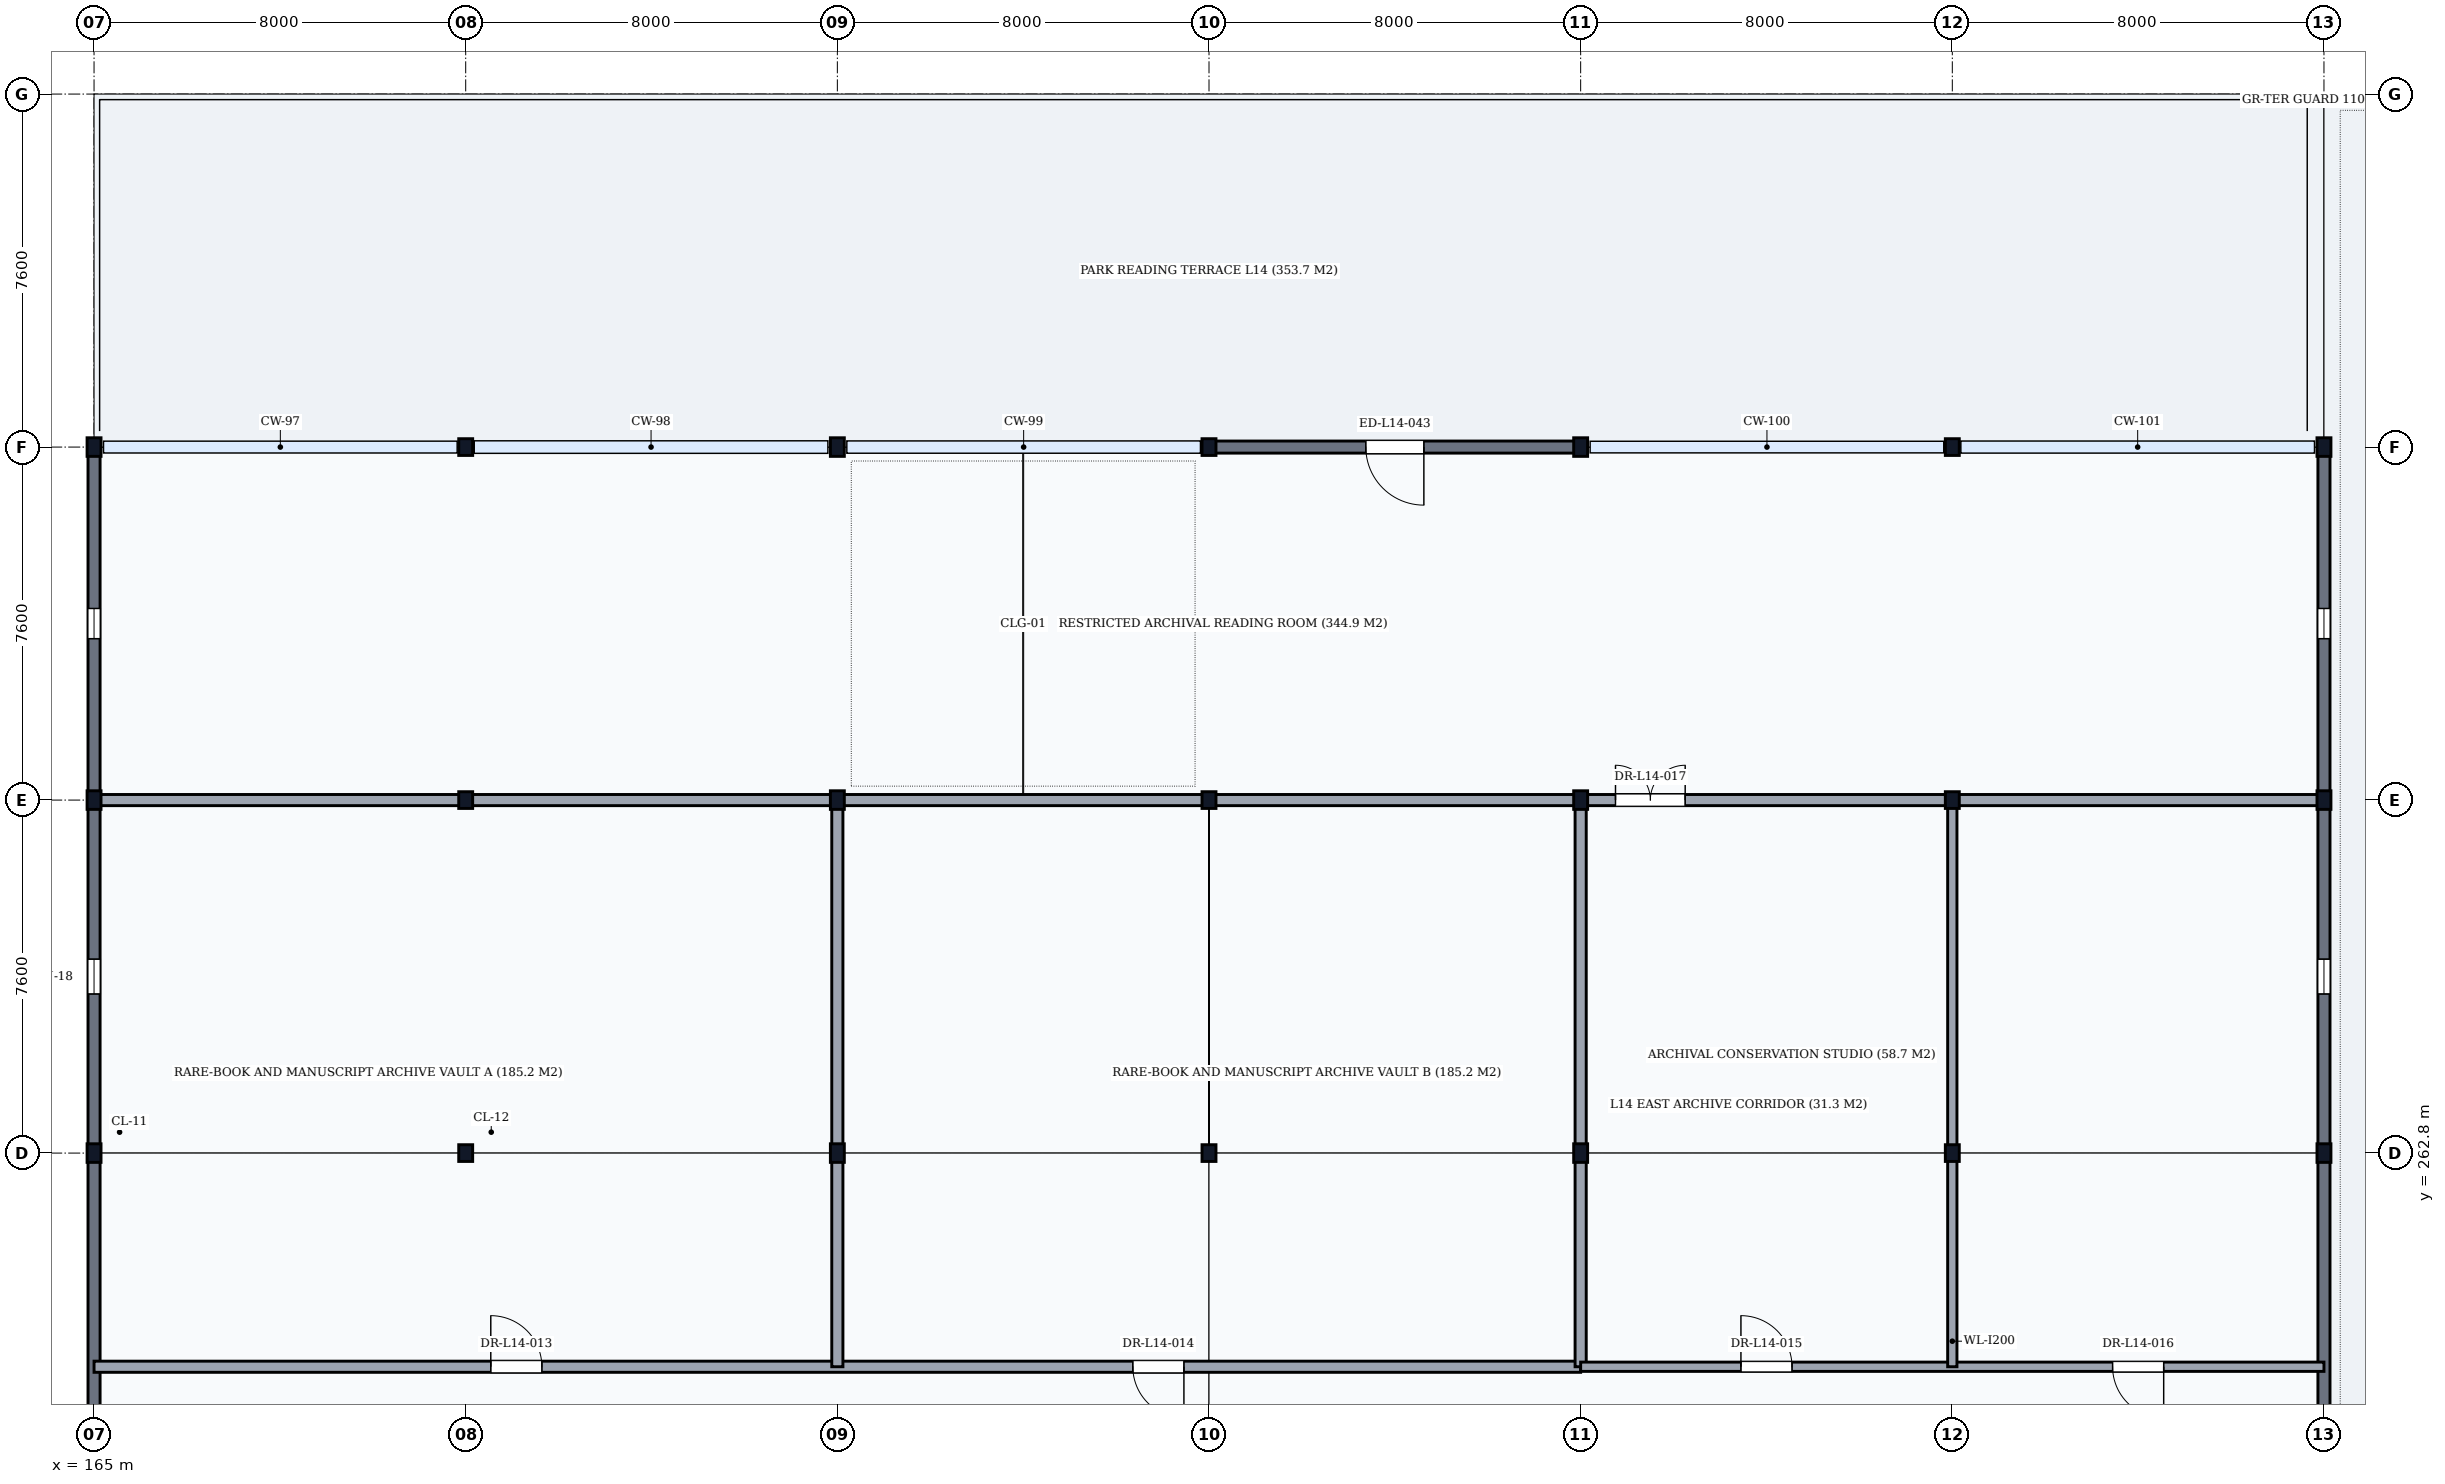
"""IFC4 building model, lengths in metres.
Left out: names, types, materials, properties, quantities, classifications, styles, units other than length and angle.
Written with IfcOpenShell. Run it as: python <this file> out.ifc"""

import sys

from ifc_helpers import new_model, si_unit, direction, frame, frame_2d, origin, origin_2d, place, context, subcontext, project, spatial, rectangle, i_section, extrude, element, fill, save


model = new_model("IFC4")
c1 = context("Model", 3, precision=1e-05, world=origin(), true_north=direction((0.0, 1.0)))
c2 = subcontext(c1, "Body", "Model", "MODEL_VIEW")
j1 = project(units=[si_unit("LENGTHUNIT", "METRE"), si_unit("PLANEANGLEUNIT", "RADIAN")], contexts=[c1])
p1 = place(None, origin())
s1 = spatial("IfcSite", under=j1, at=p1, CompositionType="ELEMENT")
p2 = place(p1, origin())
s2 = spatial("IfcBuilding", under=s1, at=p2, CompositionType="ELEMENT")
p3 = place(p2, frame((0.0, 0.0, 56.1)))
s3 = spatial("IfcBuildingStorey", under=s2, at=p3, CompositionType="ELEMENT", Elevation=56.1)
for number, where, z_axis, x_axis in (
    (1, (165.0, 262.8, 0.0), (0.0, 0.0, 1.0), (1.0, 0.0, 0.0)),
    (2, (165.0, 270.4, 0.0), (0.0, 0.0, 1.0), (1.0, 0.0, 0.0)),
    (3, (165.0, 278.0, 0.0), (0.0, 0.0, 1.0), (1.0, 0.0, 0.0)),
):
    element("IfcColumn", number, at=place(p3, frame(where, z_axis=z_axis, x_axis=x_axis)), inside=s3, PredefinedType="COLUMN", context=c2, shape_type="SweptSolid", body=[
        extrude(i_section(OverallWidth=0.3, OverallDepth=0.4, WebThickness=0.013, FlangeThickness=0.024, FilletRadius=0.027, at=origin_2d()), origin(), (0.0, 0.0, 1.0), 3.9),
    ])
for number, where, z_axis, x_axis in (
    (4, (173.0, 262.8, 0.0), (0.0, 0.0, 1.0), (1.0, 0.0, 0.0)),
    (5, (173.0, 270.4, 0.0), (0.0, 0.0, 1.0), (1.0, 0.0, 0.0)),
    (6, (173.0, 278.0, 0.0), (0.0, 0.0, 1.0), (1.0, 0.0, 0.0)),
):
    element("IfcColumn", number, at=place(p3, frame(where, z_axis=z_axis, x_axis=x_axis)), inside=s3, PredefinedType="COLUMN", context=c2, shape_type="SweptSolid", body=[
        extrude(i_section(OverallWidth=0.3, OverallDepth=0.36, WebThickness=0.012, FlangeThickness=0.022, FilletRadius=0.027, at=origin_2d()), origin(), (0.0, 0.0, 1.0), 3.9),
    ])
for number, where, z_axis, x_axis in (
    (7, (181.0, 262.8, 0.0), (0.0, 0.0, 1.0), (1.0, 0.0, 0.0)),
    (8, (181.0, 270.4, 0.0), (0.0, 0.0, 1.0), (1.0, 0.0, 0.0)),
    (9, (181.0, 278.0, 0.0), (0.0, 0.0, 1.0), (1.0, 0.0, 0.0)),
):
    element("IfcColumn", number, at=place(p3, frame(where, z_axis=z_axis, x_axis=x_axis)), inside=s3, PredefinedType="COLUMN", context=c2, shape_type="SweptSolid", body=[
        extrude(i_section(OverallWidth=0.3, OverallDepth=0.4, WebThickness=0.013, FlangeThickness=0.024, FilletRadius=0.027, at=origin_2d()), origin(), (0.0, 0.0, 1.0), 3.9),
    ])
for number, where, z_axis, x_axis in (
    (10, (189.0, 262.8, 0.0), (0.0, 0.0, 1.0), (1.0, 0.0, 0.0)),
    (11, (189.0, 270.4, 0.0), (0.0, 0.0, 1.0), (1.0, 0.0, 0.0)),
    (12, (189.0, 278.0, 0.0), (0.0, 0.0, 1.0), (1.0, 0.0, 0.0)),
):
    element("IfcColumn", number, at=place(p3, frame(where, z_axis=z_axis, x_axis=x_axis)), inside=s3, PredefinedType="COLUMN", context=c2, shape_type="SweptSolid", body=[
        extrude(i_section(OverallWidth=0.3, OverallDepth=0.36, WebThickness=0.012, FlangeThickness=0.022, FilletRadius=0.027, at=origin_2d()), origin(), (0.0, 0.0, 1.0), 3.9),
    ])
for number, where, z_axis, x_axis in (
    (13, (197.0, 262.8, 0.0), (0.0, 0.0, 1.0), (1.0, 0.0, 0.0)),
    (14, (197.0, 270.4, 0.0), (0.0, 0.0, 1.0), (1.0, 0.0, 0.0)),
    (15, (197.0, 278.0, 0.0), (0.0, 0.0, 1.0), (1.0, 0.0, 0.0)),
):
    element("IfcColumn", number, at=place(p3, frame(where, z_axis=z_axis, x_axis=x_axis)), inside=s3, PredefinedType="COLUMN", context=c2, shape_type="SweptSolid", body=[
        extrude(i_section(OverallWidth=0.3, OverallDepth=0.4, WebThickness=0.013, FlangeThickness=0.024, FilletRadius=0.027, at=origin_2d()), origin(), (0.0, 0.0, 1.0), 3.9),
    ])
for number, where, z_axis, x_axis in (
    (16, (205.0, 262.8, 0.0), (0.0, 0.0, 1.0), (1.0, 0.0, 0.0)),
    (17, (205.0, 270.4, 0.0), (0.0, 0.0, 1.0), (1.0, 0.0, 0.0)),
    (18, (205.0, 278.0, 0.0), (0.0, 0.0, 1.0), (1.0, 0.0, 0.0)),
):
    element("IfcColumn", number, at=place(p3, frame(where, z_axis=z_axis, x_axis=x_axis)), inside=s3, PredefinedType="COLUMN", context=c2, shape_type="SweptSolid", body=[
        extrude(i_section(OverallWidth=0.3, OverallDepth=0.36, WebThickness=0.012, FlangeThickness=0.022, FilletRadius=0.027, at=origin_2d()), origin(), (0.0, 0.0, 1.0), 3.9),
    ])
for number, where, z_axis, x_axis in (
    (19, (213.0, 262.8, 0.0), (0.0, 0.0, 1.0), (1.0, 0.0, 0.0)),
    (20, (213.0, 270.4, 0.0), (0.0, 0.0, 1.0), (1.0, 0.0, 0.0)),
    (21, (213.0, 278.0, 0.0), (0.0, 0.0, 1.0), (1.0, 0.0, 0.0)),
):
    element("IfcColumn", number, at=place(p3, frame(where, z_axis=z_axis, x_axis=x_axis)), inside=s3, PredefinedType="COLUMN", context=c2, shape_type="SweptSolid", body=[
        extrude(i_section(OverallWidth=0.3, OverallDepth=0.4, WebThickness=0.013, FlangeThickness=0.024, FilletRadius=0.027, at=origin_2d()), origin(), (0.0, 0.0, 1.0), 3.9),
    ])
p4 = place(p3, frame((189.006, 278.0, 0.0), z_axis=(0.0, 0.0, 1.0), x_axis=(1.0, 0.0, 0.0)))
e22 = element("IfcWall", 22, at=p4, inside=s3, PredefinedType="SOLIDWALL", context=c2, shape_type="SweptSolid", body=[
    extrude(rectangle(XDim=7.988, YDim=0.26, at=frame_2d((3.994, 0.0))), origin(), (0.0, 0.0, 1.0), 3.268),
])
p5 = place(p4, frame((3.369, 0.0, 0.0)))
e23 = element("IfcOpeningElement", 23, at=p5, cuts=e22, PredefinedType="OPENING", context=c2, shape_type="SweptSolid", body=[
    extrude(rectangle(XDim=1.25, YDim=2.15, at=frame_2d((0.625, 1.075))), frame((0.0, 0.145, 0.0), z_axis=(0.0, -1.0, 0.0), x_axis=(1.0, 0.0, 0.0)), (0.0, 0.0, 1.0), 0.29),
])
p6 = place(p3, frame((165.0, 255.206, 0.0), z_axis=(0.0, 0.0, 1.0), x_axis=(0.0, 1.0, 0.0)))
e24 = element("IfcWall", 24, at=p6, inside=s3, PredefinedType="SOLIDWALL", context=c2, shape_type="SweptSolid", body=[
    extrude(rectangle(XDim=7.588, YDim=0.26, at=frame_2d((3.794, 0.0))), origin(), (0.0, 0.0, 1.0), 3.308),
])
p7 = place(p3, frame((165.0, 262.806, 0.0), z_axis=(0.0, 0.0, 1.0), x_axis=(0.0, 1.0, 0.0)))
e25 = element("IfcWall", 25, at=p7, inside=s3, PredefinedType="SOLIDWALL", context=c2, shape_type="SweptSolid", body=[
    extrude(rectangle(XDim=7.588, YDim=0.26, at=frame_2d((3.794, 0.0))), origin(), (0.0, 0.0, 1.0), 3.308),
])
p8 = place(p7, frame((3.419, 0.0, 0.95)))
e26 = element("IfcOpeningElement", 26, at=p8, cuts=e25, PredefinedType="OPENING", context=c2, shape_type="SweptSolid", body=[
    extrude(rectangle(XDim=0.75, YDim=2.0, at=frame_2d((0.375, 1.0))), frame((0.0, 0.145, 0.0), z_axis=(0.0, -1.0, 0.0), x_axis=(1.0, 0.0, 0.0)), (0.0, 0.0, 1.0), 0.29),
])
p9 = place(p3, frame((165.0, 270.406, 0.0), z_axis=(0.0, 0.0, 1.0), x_axis=(0.0, 1.0, 0.0)))
e27 = element("IfcWall", 27, at=p9, inside=s3, PredefinedType="SOLIDWALL", context=c2, shape_type="SweptSolid", body=[
    extrude(rectangle(XDim=7.588, YDim=0.26, at=frame_2d((3.794, 0.0))), origin(), (0.0, 0.0, 1.0), 3.308),
])
p10 = place(p9, frame((3.469, 0.0, 0.95)))
e28 = element("IfcOpeningElement", 28, at=p10, cuts=e27, PredefinedType="OPENING", context=c2, shape_type="SweptSolid", body=[
    extrude(rectangle(XDim=0.65, YDim=1.8, at=frame_2d((0.325, 0.9))), frame((0.0, 0.145, 0.0), z_axis=(0.0, -1.0, 0.0), x_axis=(1.0, 0.0, 0.0)), (0.0, 0.0, 1.0), 0.29),
])
p11 = place(p3, frame((213.0, 255.206, 0.0), z_axis=(0.0, 0.0, 1.0), x_axis=(0.0, 1.0, 0.0)))
e29 = element("IfcWall", 29, at=p11, inside=s3, PredefinedType="SOLIDWALL", context=c2, shape_type="SweptSolid", body=[
    extrude(rectangle(XDim=7.588, YDim=0.26, at=frame_2d((3.794, 0.0))), origin(), (0.0, 0.0, 1.0), 3.308),
])
p12 = place(p3, frame((213.0, 262.806, 0.0), z_axis=(0.0, 0.0, 1.0), x_axis=(0.0, 1.0, 0.0)))
e30 = element("IfcWall", 30, at=p12, inside=s3, PredefinedType="SOLIDWALL", context=c2, shape_type="SweptSolid", body=[
    extrude(rectangle(XDim=7.588, YDim=0.26, at=frame_2d((3.794, 0.0))), origin(), (0.0, 0.0, 1.0), 3.308),
])
p13 = place(p12, frame((3.419, 0.0, 0.95)))
e31 = element("IfcOpeningElement", 31, at=p13, cuts=e30, PredefinedType="OPENING", context=c2, shape_type="SweptSolid", body=[
    extrude(rectangle(XDim=0.75, YDim=2.0, at=frame_2d((0.375, 1.0))), frame((0.0, 0.145, 0.0), z_axis=(0.0, -1.0, 0.0), x_axis=(1.0, 0.0, 0.0)), (0.0, 0.0, 1.0), 0.29),
])
p14 = place(p3, frame((213.0, 270.406, 0.0), z_axis=(0.0, 0.0, 1.0), x_axis=(0.0, 1.0, 0.0)))
e32 = element("IfcWall", 32, at=p14, inside=s3, PredefinedType="SOLIDWALL", context=c2, shape_type="SweptSolid", body=[
    extrude(rectangle(XDim=7.588, YDim=0.26, at=frame_2d((3.794, 0.0))), origin(), (0.0, 0.0, 1.0), 3.308),
])
p15 = place(p14, frame((3.469, 0.0, 0.95)))
e33 = element("IfcOpeningElement", 33, at=p15, cuts=e32, PredefinedType="OPENING", context=c2, shape_type="SweptSolid", body=[
    extrude(rectangle(XDim=0.65, YDim=1.8, at=frame_2d((0.325, 0.9))), frame((0.0, 0.145, 0.0), z_axis=(0.0, -1.0, 0.0), x_axis=(1.0, 0.0, 0.0)), (0.0, 0.0, 1.0), 0.29),
])
p16 = place(p3, frame((165.0, 258.2, 0.0), z_axis=(0.0, 0.0, 1.0), x_axis=(1.0, 0.0, 0.0)))
e34 = element("IfcWall", 34, at=p16, inside=s3, PredefinedType="PARTITIONING", context=c2, shape_type="SweptSolid", body=[
    extrude(rectangle(XDim=32.0, YDim=0.24, at=frame_2d((16.0, 0.0))), origin(), (0.0, 0.0, 1.0), 3.58),
])
p17 = place(p16, frame((8.54, 0.0, 0.0)))
e35 = element("IfcOpeningElement", 35, at=p17, cuts=e34, PredefinedType="OPENING", context=c2, shape_type="SweptSolid", body=[
    extrude(rectangle(XDim=1.1, YDim=2.1, at=frame_2d((0.55, 1.05))), frame((0.0, 0.135, 0.0), z_axis=(0.0, -1.0, 0.0), x_axis=(1.0, 0.0, 0.0)), (0.0, 0.0, 1.0), 0.27),
])
p18 = place(p16, frame((22.36, 0.0, 0.0)))
e36 = element("IfcOpeningElement", 36, at=p18, cuts=e34, PredefinedType="OPENING", context=c2, shape_type="SweptSolid", body=[
    extrude(rectangle(XDim=1.1, YDim=2.1, at=frame_2d((0.55, 1.05))), frame((0.0, 0.135, 0.0), z_axis=(0.0, -1.0, 0.0), x_axis=(1.0, 0.0, 0.0)), (0.0, 0.0, 1.0), 0.27),
])
for number, where, z_axis, x_axis in (
    (37, (181.0, 258.2, 0.0), (0.0, 0.0, 1.0), (0.0, 1.0, 0.0)),
    (38, (197.0, 258.2, 0.0), (0.0, 0.0, 1.0), (0.0, 1.0, 0.0)),
):
    element("IfcWall", number, at=place(p3, frame(where, z_axis=z_axis, x_axis=x_axis)), inside=s3, PredefinedType="PARTITIONING", context=c2, shape_type="SweptSolid", body=[
        extrude(rectangle(XDim=12.2, YDim=0.24, at=frame_2d((6.1, 0.0))), origin(), (0.0, 0.0, 1.0), 3.028),
    ])
p19 = place(p3, frame((197.0, 258.2, 0.0), z_axis=(0.0, 0.0, 1.0), x_axis=(1.0, 0.0, 0.0)))
e39 = element("IfcWall", 39, at=p19, inside=s3, PredefinedType="PARTITIONING", context=c2, shape_type="SweptSolid", body=[
    extrude(rectangle(XDim=16.0, YDim=0.2, at=frame_2d((8.0, 0.0))), origin(), (0.0, 0.0, 1.0), 3.58),
])
p20 = place(p19, frame((3.45, 0.0, 0.0)))
e40 = element("IfcOpeningElement", 40, at=p20, cuts=e39, PredefinedType="OPENING", context=c2, shape_type="SweptSolid", body=[
    extrude(rectangle(XDim=1.1, YDim=2.1, at=frame_2d((0.55, 1.05))), frame((0.0, 0.115, 0.0), z_axis=(0.0, -1.0, 0.0), x_axis=(1.0, 0.0, 0.0)), (0.0, 0.0, 1.0), 0.23),
])
p21 = place(p19, frame((11.45, 0.0, 0.0)))
e41 = element("IfcOpeningElement", 41, at=p21, cuts=e39, PredefinedType="OPENING", context=c2, shape_type="SweptSolid", body=[
    extrude(rectangle(XDim=1.1, YDim=2.1, at=frame_2d((0.55, 1.05))), frame((0.0, 0.115, 0.0), z_axis=(0.0, -1.0, 0.0), x_axis=(1.0, 0.0, 0.0)), (0.0, 0.0, 1.0), 0.23),
])
p22 = place(p3, frame((205.0, 258.2, 0.0), z_axis=(0.0, 0.0, 1.0), x_axis=(0.0, 1.0, 0.0)))
e42 = element("IfcWall", 42, at=p22, inside=s3, PredefinedType="PARTITIONING", context=c2, shape_type="SweptSolid", body=[
    extrude(rectangle(XDim=12.2, YDim=0.2, at=frame_2d((6.1, 0.0))), origin(), (0.0, 0.0, 1.0), 3.028),
])
p23 = place(p3, frame((165.0, 270.4, 0.0), z_axis=(0.0, 0.0, 1.0), x_axis=(1.0, 0.0, 0.0)))
e43 = element("IfcWall", 43, at=p23, inside=s3, PredefinedType="PARTITIONING", context=c2, shape_type="SweptSolid", body=[
    extrude(rectangle(XDim=48.0, YDim=0.24, at=frame_2d((24.0, 0.0))), origin(), (0.0, 0.0, 1.0), 3.028),
])
p24 = place(p23, frame((32.75, 0.0, 0.0)))
e44 = element("IfcOpeningElement", 44, at=p24, cuts=e43, PredefinedType="OPENING", context=c2, shape_type="SweptSolid", body=[
    extrude(rectangle(XDim=1.5, YDim=2.25, at=frame_2d((0.75, 1.125))), frame((0.0, 0.135, 0.0), z_axis=(0.0, -1.0, 0.0), x_axis=(1.0, 0.0, 0.0)), (0.0, 0.0, 1.0), 0.27),
])
p25 = place(p5, origin())
e45 = element("IfcDoor", 45, at=p25, inside=s3, OperationType="SINGLE_SWING_RIGHT", PredefinedType="DOOR", context=c2, shape_type="SweptSolid", body=[
    extrude(rectangle(XDim=1.25, YDim=2.15, at=frame_2d((0.625, 1.075))), frame((0.0, 0.025, 0.0), z_axis=(0.0, -1.0, 0.0), x_axis=(1.0, 0.0, 0.0)), (0.0, 0.0, 1.0), 0.05),
])
fill(e23, e45)
p26 = place(p8, origin())
e46 = element("IfcWindow", 46, at=p26, inside=s3, PartitioningType="SINGLE_PANEL", PredefinedType="WINDOW", context=c2, shape_type="SweptSolid", body=[
    extrude(rectangle(XDim=0.75, YDim=2.0, at=frame_2d((0.375, 1.0))), frame((0.0, 0.03, 0.0), z_axis=(0.0, -1.0, 0.0), x_axis=(1.0, 0.0, 0.0)), (0.0, 0.0, 1.0), 0.06),
])
fill(e26, e46)
p27 = place(p10, origin())
e47 = element("IfcWindow", 47, at=p27, inside=s3, PartitioningType="SINGLE_PANEL", PredefinedType="WINDOW", context=c2, shape_type="SweptSolid", body=[
    extrude(rectangle(XDim=0.65, YDim=1.8, at=frame_2d((0.325, 0.9))), frame((0.0, 0.03, 0.0), z_axis=(0.0, -1.0, 0.0), x_axis=(1.0, 0.0, 0.0)), (0.0, 0.0, 1.0), 0.06),
])
fill(e28, e47)
p28 = place(p13, origin())
e48 = element("IfcWindow", 48, at=p28, inside=s3, PartitioningType="SINGLE_PANEL", PredefinedType="WINDOW", context=c2, shape_type="SweptSolid", body=[
    extrude(rectangle(XDim=0.75, YDim=2.0, at=frame_2d((0.375, 1.0))), frame((0.0, 0.03, 0.0), z_axis=(0.0, -1.0, 0.0), x_axis=(1.0, 0.0, 0.0)), (0.0, 0.0, 1.0), 0.06),
])
fill(e31, e48)
p29 = place(p15, origin())
e49 = element("IfcWindow", 49, at=p29, inside=s3, PartitioningType="SINGLE_PANEL", PredefinedType="WINDOW", context=c2, shape_type="SweptSolid", body=[
    extrude(rectangle(XDim=0.65, YDim=1.8, at=frame_2d((0.325, 0.9))), frame((0.0, 0.03, 0.0), z_axis=(0.0, -1.0, 0.0), x_axis=(1.0, 0.0, 0.0)), (0.0, 0.0, 1.0), 0.06),
])
fill(e33, e49)
p30 = place(p17, origin())
e50 = element("IfcDoor", 50, at=p30, inside=s3, OperationType="SINGLE_SWING_LEFT", PredefinedType="DOOR", context=c2, shape_type="SweptSolid", body=[
    extrude(rectangle(XDim=1.1, YDim=2.1, at=frame_2d((0.55, 1.05))), frame((0.0, 0.025, 0.0), z_axis=(0.0, -1.0, 0.0), x_axis=(1.0, 0.0, 0.0)), (0.0, 0.0, 1.0), 0.05),
])
fill(e35, e50)
p31 = place(p18, origin())
e51 = element("IfcDoor", 51, at=p31, inside=s3, OperationType="SINGLE_SWING_RIGHT", PredefinedType="DOOR", context=c2, shape_type="SweptSolid", body=[
    extrude(rectangle(XDim=1.1, YDim=2.1, at=frame_2d((0.55, 1.05))), frame((0.0, 0.025, 0.0), z_axis=(0.0, -1.0, 0.0), x_axis=(1.0, 0.0, 0.0)), (0.0, 0.0, 1.0), 0.05),
])
fill(e36, e51)
p32 = place(p20, origin())
e52 = element("IfcDoor", 52, at=p32, inside=s3, OperationType="SINGLE_SWING_LEFT", PredefinedType="DOOR", context=c2, shape_type="SweptSolid", body=[
    extrude(rectangle(XDim=1.1, YDim=2.1, at=frame_2d((0.55, 1.05))), frame((0.0, 0.025, 0.0), z_axis=(0.0, -1.0, 0.0), x_axis=(1.0, 0.0, 0.0)), (0.0, 0.0, 1.0), 0.05),
])
fill(e40, e52)
p33 = place(p21, origin())
e53 = element("IfcDoor", 53, at=p33, inside=s3, OperationType="SINGLE_SWING_RIGHT", PredefinedType="DOOR", context=c2, shape_type="SweptSolid", body=[
    extrude(rectangle(XDim=1.1, YDim=2.1, at=frame_2d((0.55, 1.05))), frame((0.0, 0.025, 0.0), z_axis=(0.0, -1.0, 0.0), x_axis=(1.0, 0.0, 0.0)), (0.0, 0.0, 1.0), 0.05),
])
fill(e41, e53)
p34 = place(p24, origin())
e54 = element("IfcDoor", 54, at=p34, inside=s3, OperationType="DOUBLE_DOOR_SINGLE_SWING", PredefinedType="DOOR", context=c2, shape_type="SweptSolid", body=[
    extrude(rectangle(XDim=1.5, YDim=2.25, at=frame_2d((0.75, 1.125))), frame((0.0, 0.025, 0.0), z_axis=(0.0, -1.0, 0.0), x_axis=(1.0, 0.0, 0.0)), (0.0, 0.0, 1.0), 0.05),
])
fill(e44, e54)
save(model, sys.argv[1])
